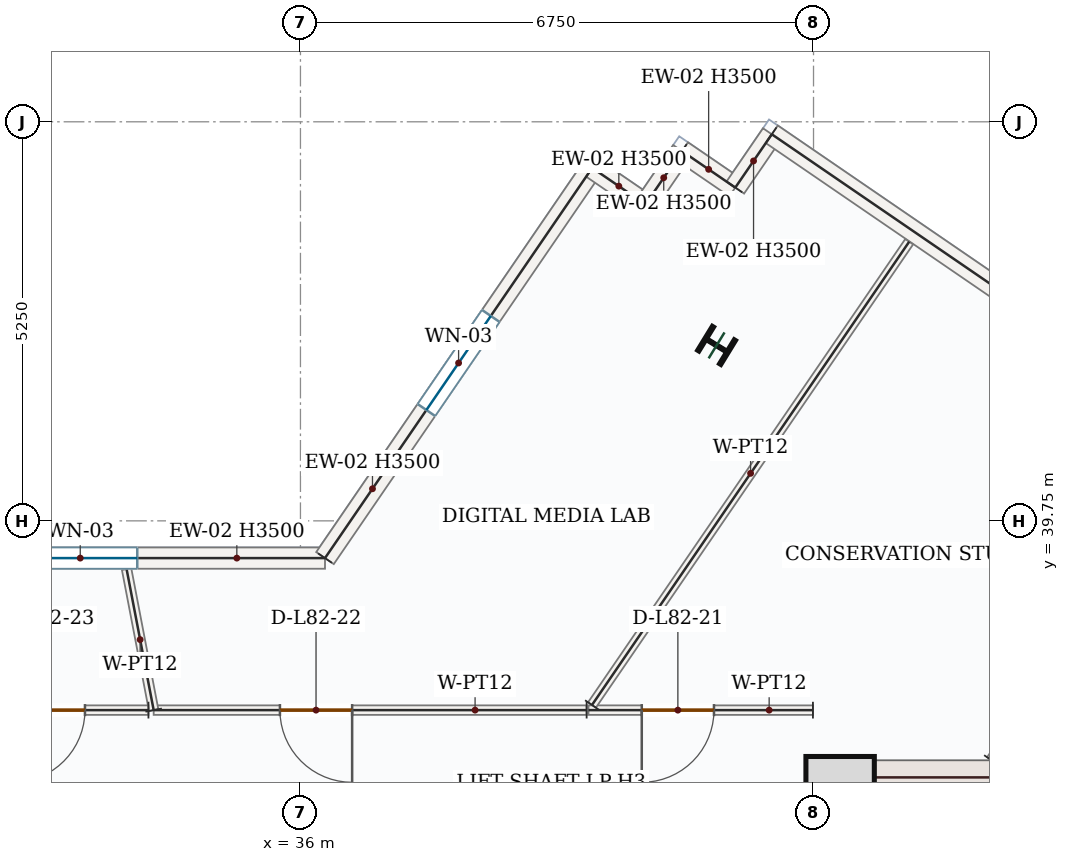
"""IFC4 building model, lengths in metres.
Left out: names, types, materials, properties, quantities, classifications, styles, units other than length and angle.
Written with IfcOpenShell. Run it as: python <this file> out.ifc"""

import sys

from ifc_helpers import new_model, si_unit, direction, frame, frame_2d, origin, origin_2d, place, context, subcontext, project, spatial, rectangle, i_section, extrude, source, transform, mapped, element, fill, save


model = new_model("IFC4")
c1 = context("Model", 3, precision=1e-05, world=origin(), true_north=direction((0.0, 1.0)))
c2 = subcontext(c1, "Body", "Model", "MODEL_VIEW")
j1 = project(units=[si_unit("LENGTHUNIT", "METRE"), si_unit("PLANEANGLEUNIT", "RADIAN")], contexts=[c1])
p1 = place(None, origin())
s1 = spatial("IfcSite", under=j1, at=p1, CompositionType="ELEMENT")
p2 = place(p1, origin())
s2 = spatial("IfcBuilding", under=s1, at=p2, CompositionType="ELEMENT")
p3 = place(p2, frame((0.0, 0.0, 338.55)))
s3 = spatial("IfcBuildingStorey", under=s2, at=p3, CompositionType="ELEMENT", Elevation=338.55)
p4 = place(p3, frame((42.975, 28.05, 0.0), z_axis=(0.0, 0.0, 1.0), x_axis=(0.0, 1.0, 0.0)))
e1 = element("IfcWall", 1, at=p4, inside=s3, PredefinedType="SHEAR", context=c2, shape_type="SweptSolid", body=[
    extrude(rectangle(XDim=8.55, YDim=0.45, at=frame_2d((4.275, 0.0))), origin(), (0.0, 0.0, 1.0), 3.5),
])
p5 = place(p4, frame((1.5, 0.0, 0.0)))
e2 = element("IfcOpeningElement", 2, at=p5, cuts=e1, PredefinedType="OPENING", context=c2, shape_type="SweptSolid", body=[
    extrude(rectangle(XDim=1.1, YDim=2.2, at=frame_2d((0.55, 1.1))), frame((0.0, 0.235, 0.0), z_axis=(0.0, -1.0, 0.0), x_axis=(1.0, 0.0, 0.0)), (0.0, 0.0, 1.0), 0.47),
])
m1 = source(origin(), c2, "Body", "SweptSolid", [
    extrude(rectangle(XDim=7.1, YDim=0.45, at=frame_2d((3.55, 0.0))), origin(), (0.0, 0.0, 1.0), 3.5),
])
p6 = place(p3, frame((43.2, 36.375, 0.0), z_axis=(0.0, 0.0, 1.0), x_axis=(1.0, 0.0, 0.0)))
e3 = element("IfcWall", 3, at=p6, inside=s3, PredefinedType="SHEAR", context=c2, shape_type="MappedRepresentation", body=[
    mapped(m1, transform((0.0, 0.0, 0.0), x_axis=(1.0, 0.0, 0.0), y_axis=(0.0, 1.0, 0.0), z_axis=(0.0, 0.0, 1.0), scale=1.0)),
])
m2 = source(origin(), c2, "Body", "SweptSolid", [
    extrude(rectangle(XDim=0.9, YDim=0.9, at=origin_2d()), origin(), (0.0, 0.0, 1.0), 3.75),
])
p7 = place(p3, frame((43.1, 36.2, 0.0), z_axis=(0.0, 0.0, 1.0), x_axis=(1.0, 0.0, 0.0)))
e4 = element("IfcColumn", 4, at=p7, inside=s3, PredefinedType="COLUMN", context=c2, shape_type="MappedRepresentation", body=[
    mapped(m2, transform((0.0, 0.0, 0.0), x_axis=(1.0, 0.0, 0.0), y_axis=(0.0, 1.0, 0.0), z_axis=(0.0, 0.0, 1.0), scale=1.0)),
])
m3 = source(origin(), c2, "Body", "SweptSolid", [
    extrude(i_section(OverallWidth=0.369, OverallDepth=0.356, WebThickness=0.011, FlangeThickness=0.018, FilletRadius=0.018, at=origin_2d()), origin(), (0.0, 0.0, 1.0), 3.75),
])
p8 = place(p3, frame((41.475, 42.058, 0.0), z_axis=(0.0, 0.0, 1.0), x_axis=(0.522498564716, 0.852640164354, 0.0)))
e5 = element("IfcColumn", 5, at=p8, inside=s3, PredefinedType="COLUMN", context=c2, shape_type="MappedRepresentation", body=[
    mapped(m3, transform((0.0, 0.0, 0.0), x_axis=(1.0, 0.0, 0.0), y_axis=(0.0, 1.0, 0.0), z_axis=(0.0, 0.0, 1.0), scale=1.0)),
])
p9 = place(p3, frame((29.883, 39.26, 0.0), z_axis=(0.0, 0.0, 1.0), x_axis=(1.0, 0.0, 0.0)))
e6 = element("IfcWall", 6, at=p9, inside=s3, PredefinedType="SOLIDWALL", context=c2, shape_type="SweptSolid", body=[
    extrude(rectangle(XDim=6.44, YDim=0.28, at=frame_2d((3.22, 0.0))), origin(), (0.0, 0.0, 1.0), 3.5),
])
p10 = place(p9, frame((2.47, 0.0, 0.85)))
e7 = element("IfcOpeningElement", 7, at=p10, cuts=e6, PredefinedType="OPENING", context=c2, shape_type="SweptSolid", body=[
    extrude(rectangle(XDim=1.5, YDim=1.5, at=frame_2d((0.75, 0.75))), frame((0.0, 0.15, 0.0), z_axis=(0.0, -1.0, 0.0), x_axis=(1.0, 0.0, 0.0)), (0.0, 0.0, 1.0), 0.3),
])
p11 = place(p3, frame((36.323, 39.26, 0.0), z_axis=(0.0, 0.0, 1.0), x_axis=(0.564953982519, 0.825122413728, 0.0)))
e8 = element("IfcWall", 8, at=p11, inside=s3, PredefinedType="SOLIDWALL", context=c2, shape_type="SweptSolid", body=[
    extrude(rectangle(XDim=6.221, YDim=0.28, at=frame_2d((3.111, 0.0))), origin(), (0.0, 0.0, 1.0), 3.5),
])
p12 = place(p11, frame((2.361, 0.0, 0.85)))
e9 = element("IfcOpeningElement", 9, at=p12, cuts=e8, PredefinedType="OPENING", context=c2, shape_type="SweptSolid", body=[
    extrude(rectangle(XDim=1.5, YDim=1.5, at=frame_2d((0.75, 0.75))), frame((0.0, 0.15, 0.0), z_axis=(0.0, -1.0, 0.0), x_axis=(1.0, 0.0, 0.0)), (0.0, 0.0, 1.0), 0.3),
])
m4 = source(origin(), c2, "Body", "SweptSolid", [
    extrude(rectangle(XDim=0.85, YDim=0.28, at=frame_2d((0.425, 0.0))), origin(), (0.0, 0.0, 1.0), 3.5),
])
for number, where, z_axis, x_axis in (
    (10, (39.838, 44.394, 0.0), (0.0, 0.0, 1.0), (0.825, -0.565, 0.0)),
    (11, (40.539, 43.913, 0.0), (0.0, 0.0, 1.0), (0.565, 0.825, 0.0)),
    (12, (41.02, 44.615, 0.0), (0.0, 0.0, 1.0), (0.825, -0.565, 0.0)),
):
    element("IfcWall", number, at=place(p3, frame(where, z_axis=z_axis, x_axis=x_axis)), inside=s3, PredefinedType="SOLIDWALL", context=c2, shape_type="MappedRepresentation", body=[
        mapped(m4, transform((0.0, 0.0, 0.0), x_axis=(1.0, 0.0, 0.0), y_axis=(0.0, 1.0, 0.0), z_axis=(0.0, 0.0, 1.0), scale=1.0)),
    ])
m5 = source(origin(), c2, "Body", "SweptSolid", [
    extrude(rectangle(XDim=0.85, YDim=0.28, at=frame_2d((0.425, 0.0))), origin(), (0.0, 0.0, 1.0), 3.5),
])
p13 = place(p3, frame((41.721, 44.135, 0.0), z_axis=(0.0, 0.0, 1.0), x_axis=(0.565064897913, 0.825046459993, 0.0)))
e13 = element("IfcWall", 13, at=p13, inside=s3, PredefinedType="SOLIDWALL", context=c2, shape_type="MappedRepresentation", body=[
    mapped(m5, transform((0.0, 0.0, 0.0), x_axis=(1.0, 0.0, 0.0), y_axis=(0.0, 1.0, 0.0), z_axis=(0.0, 0.0, 1.0), scale=1.0)),
])
p14 = place(p3, frame((42.201, 44.836, 0.0), z_axis=(0.0, 0.0, 1.0), x_axis=(0.825121888295, -0.56495474992, 0.0)))
e14 = element("IfcWall", 14, at=p14, inside=s3, PredefinedType="SOLIDWALL", context=c2, shape_type="SweptSolid", body=[
    extrude(rectangle(XDim=9.92, YDim=0.28, at=frame_2d((4.96, 0.0))), origin(), (0.0, 0.0, 1.0), 3.5),
])
p15 = place(p14, frame((4.21, 0.0, 0.85)))
e15 = element("IfcOpeningElement", 15, at=p15, cuts=e14, PredefinedType="OPENING", context=c2, shape_type="SweptSolid", body=[
    extrude(rectangle(XDim=1.5, YDim=1.5, at=frame_2d((0.75, 0.75))), frame((0.0, 0.15, 0.0), z_axis=(0.0, -1.0, 0.0), x_axis=(1.0, 0.0, 0.0)), (0.0, 0.0, 1.0), 0.3),
])
m6 = source(origin(), c2, "Body", "SweptSolid", [
    extrude(rectangle(XDim=2.511, YDim=0.125, at=frame_2d((1.255, 0.0))), origin(), (0.0, 0.0, 1.0), 3.5),
])
p16 = place(p3, frame((45.085, 36.605, 0.0), z_axis=(0.0, 0.0, 1.0), x_axis=(0.564980194272, 0.825104466162, 0.0)))
e16 = element("IfcWall", 16, at=p16, inside=s3, PredefinedType="PARTITIONING", context=c2, shape_type="MappedRepresentation", body=[
    mapped(m6, transform((0.0, 0.0, 0.0), x_axis=(1.0, 0.0, 0.0), y_axis=(0.0, 1.0, 0.0), z_axis=(0.0, 0.0, 1.0), scale=1.0)),
])
p17 = place(p3, frame((42.742, 37.26, 0.0), z_axis=(0.0, 0.0, 1.0), x_axis=(-0.999999996583, 8.2671957e-05, 0.0)))
e17 = element("IfcWall", 17, at=p17, inside=s3, PredefinedType="PARTITIONING", context=c2, shape_type="SweptSolid", body=[
    extrude(rectangle(XDim=2.953, YDim=0.125, at=frame_2d((1.477, 0.0))), origin(), (0.0, 0.0, 1.0), 3.5),
])
p18 = place(p17, frame((1.302, 0.0, 0.0)))
e18 = element("IfcOpeningElement", 18, at=p18, cuts=e17, PredefinedType="OPENING", context=c2, shape_type="SweptSolid", body=[
    extrude(rectangle(XDim=0.95, YDim=2.15, at=frame_2d((0.475, 1.075))), frame((0.0, 0.073, 0.0), z_axis=(0.0, -1.0, 0.0), x_axis=(1.0, 0.0, 0.0)), (0.0, 0.0, 1.0), 0.145),
])
m7 = source(origin(), c2, "Body", "SweptSolid", [
    extrude(rectangle(XDim=7.387, YDim=0.125, at=frame_2d((3.693, 0.0))), origin(), (0.0, 0.0, 1.0), 3.5),
])
p19 = place(p3, frame((39.835, 37.327, 0.0), z_axis=(0.0, 0.0, 1.0), x_axis=(0.564969427755, 0.8251118383, 0.0)))
e19 = element("IfcWall", 19, at=p19, inside=s3, PredefinedType="PARTITIONING", context=c2, shape_type="MappedRepresentation", body=[
    mapped(m7, transform((0.0, 0.0, 0.0), x_axis=(1.0, 0.0, 0.0), y_axis=(0.0, 1.0, 0.0), z_axis=(0.0, 0.0, 1.0), scale=1.0)),
])
p20 = place(p3, frame((39.765, 37.26, 0.0), z_axis=(0.0, 0.0, 1.0), x_axis=(-1.0, 0.0, 0.0)))
e20 = element("IfcWall", 20, at=p20, inside=s3, PredefinedType="PARTITIONING", context=c2, shape_type="SweptSolid", body=[
    extrude(rectangle(XDim=5.696, YDim=0.125, at=frame_2d((2.848, 0.0))), origin(), (0.0, 0.0, 1.0), 3.5),
])
p21 = place(p20, frame((3.085, 0.0, 0.0)))
e21 = element("IfcOpeningElement", 21, at=p21, cuts=e20, PredefinedType="OPENING", context=c2, shape_type="SweptSolid", body=[
    extrude(rectangle(XDim=0.95, YDim=2.15, at=frame_2d((0.475, 1.075))), frame((0.0, 0.073, 0.0), z_axis=(0.0, -1.0, 0.0), x_axis=(1.0, 0.0, 0.0)), (0.0, 0.0, 1.0), 0.145),
])
m8 = source(origin(), c2, "Body", "SweptSolid", [
    extrude(rectangle(XDim=1.889, YDim=0.125, at=frame_2d((0.944, 0.0))), origin(), (0.0, 0.0, 1.0), 3.5),
])
p22 = place(p3, frame((34.069, 37.26, 0.0), z_axis=(0.0, 0.0, 1.0), x_axis=(-0.188454265316, 0.982081966989, 0.0)))
e22 = element("IfcWall", 22, at=p22, inside=s3, PredefinedType="PARTITIONING", context=c2, shape_type="MappedRepresentation", body=[
    mapped(m8, transform((0.0, 0.0, 0.0), x_axis=(1.0, 0.0, 0.0), y_axis=(0.0, 1.0, 0.0), z_axis=(0.0, 0.0, 1.0), scale=1.0)),
])
p23 = place(p3, frame((34.0, 37.26, 0.0), z_axis=(0.0, 0.0, 1.0), x_axis=(-0.999999994709, -0.000102870075, 0.0)))
e23 = element("IfcWall", 23, at=p23, inside=s3, PredefinedType="PARTITIONING", context=c2, shape_type="SweptSolid", body=[
    extrude(rectangle(XDim=4.747, YDim=0.125, at=frame_2d((2.373, 0.0))), origin(), (0.0, 0.0, 1.0), 3.5),
])
p24 = place(p23, frame((0.835, 0.0, 0.0)))
e24 = element("IfcOpeningElement", 24, at=p24, cuts=e23, PredefinedType="OPENING", context=c2, shape_type="SweptSolid", body=[
    extrude(rectangle(XDim=0.95, YDim=2.15, at=frame_2d((0.475, 1.075))), frame((0.0, 0.073, 0.0), z_axis=(0.0, -1.0, 0.0), x_axis=(1.0, 0.0, 0.0)), (0.0, 0.0, 1.0), 0.145),
])
m9 = source(origin(), c2, "Body", "SweptSolid", [
    extrude(rectangle(XDim=1.5, YDim=1.5, at=frame_2d((0.75, 0.75))), frame((0.0, 0.03, 0.0), z_axis=(0.0, -1.0, 0.0), x_axis=(1.0, 0.0, 0.0)), (0.0, 0.0, 1.0), 0.06),
])
p25 = place(p10, origin())
e25 = element("IfcWindow", 25, at=p25, inside=s3, PartitioningType="SINGLE_PANEL", PredefinedType="WINDOW", context=c2, shape_type="MappedRepresentation", body=[
    mapped(m9, transform((0.0, 0.0, 0.0), x_axis=(1.0, 0.0, 0.0), y_axis=(0.0, 1.0, 0.0), z_axis=(0.0, 0.0, 1.0), scale=1.0)),
])
fill(e7, e25)
p26 = place(p12, origin())
e26 = element("IfcWindow", 26, at=p26, inside=s3, PartitioningType="SINGLE_PANEL", PredefinedType="WINDOW", context=c2, shape_type="MappedRepresentation", body=[
    mapped(m9, transform((0.0, 0.0, 0.0), x_axis=(1.0, 0.0, 0.0), y_axis=(0.0, 1.0, 0.0), z_axis=(0.0, 0.0, 1.0), scale=1.0)),
])
fill(e9, e26)
m10 = source(origin(), c2, "Body", "SweptSolid", [
    extrude(rectangle(XDim=0.95, YDim=2.15, at=frame_2d((0.475, 1.075))), frame((0.0, 0.025, 0.0), z_axis=(0.0, -1.0, 0.0), x_axis=(1.0, 0.0, 0.0)), (0.0, 0.0, 1.0), 0.05),
])
p27 = place(p18, origin())
e27 = element("IfcDoor", 27, at=p27, inside=s3, OperationType="SINGLE_SWING_RIGHT", PredefinedType="DOOR", context=c2, shape_type="MappedRepresentation", body=[
    mapped(m10, transform((0.0, 0.0, 0.0), x_axis=(1.0, 0.0, 0.0), y_axis=(0.0, 1.0, 0.0), z_axis=(0.0, 0.0, 1.0), scale=1.0)),
])
fill(e18, e27)
p28 = place(p21, origin())
e28 = element("IfcDoor", 28, at=p28, inside=s3, OperationType="SINGLE_SWING_LEFT", PredefinedType="DOOR", context=c2, shape_type="MappedRepresentation", body=[
    mapped(m10, transform((0.0, 0.0, 0.0), x_axis=(1.0, 0.0, 0.0), y_axis=(0.0, 1.0, 0.0), z_axis=(0.0, 0.0, 1.0), scale=1.0)),
])
fill(e21, e28)
p29 = place(p24, origin())
e29 = element("IfcDoor", 29, at=p29, inside=s3, OperationType="SINGLE_SWING_RIGHT", PredefinedType="DOOR", context=c2, shape_type="MappedRepresentation", body=[
    mapped(m10, transform((0.0, 0.0, 0.0), x_axis=(1.0, 0.0, 0.0), y_axis=(0.0, 1.0, 0.0), z_axis=(0.0, 0.0, 1.0), scale=1.0)),
])
fill(e24, e29)
save(model, sys.argv[1])
